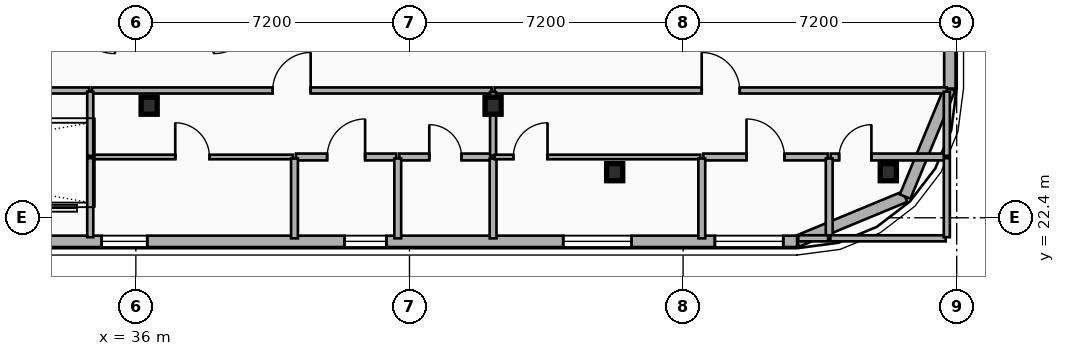
"""IFC4 building model, lengths in metres.
Left out: names, types, materials, properties, quantities, classifications, styles, units other than length and angle.
Written with IfcOpenShell. Run it as: python <this file> out.ifc"""

import sys

from ifc_helpers import new_model, si_unit, direction, frame, frame_2d, origin, origin_2d, place, context, subcontext, project, spatial, rectangle, i_section, extrude, element, fill, save


model = new_model("IFC4")
c1 = context("Model", 3, precision=1e-05, world=origin(), true_north=direction((0.0, 1.0)))
c2 = subcontext(c1, "Body", "Model", "MODEL_VIEW")
j1 = project(units=[si_unit("LENGTHUNIT", "METRE"), si_unit("PLANEANGLEUNIT", "RADIAN")], contexts=[c1])
p1 = place(None, origin())
s1 = spatial("IfcSite", under=j1, at=p1, CompositionType="ELEMENT")
p2 = place(p1, origin())
s2 = spatial("IfcBuilding", under=s1, at=p2, CompositionType="ELEMENT")
p3 = place(p2, frame((0.0, 0.0, 67.5)))
s3 = spatial("IfcBuildingStorey", under=s2, at=p3, CompositionType="ELEMENT", Elevation=67.5)
for number, where, z_axis, x_axis in (
    (1, (36.35, 25.35, 0.0), (0.0, 0.0, 1.0), (1.0, 0.0, 0.0)),
    (2, (45.4, 25.35, 0.0), (0.0, 0.0, 1.0), (1.0, 0.0, 0.0)),
    (3, (48.6, 23.6, 0.0), (0.0, 0.0, 1.0), (1.0, 0.0, 0.0)),
    (4, (55.8, 23.6, 0.0), (0.0, 0.0, 1.0), (1.0, 0.0, 0.0)),
):
    element("IfcColumn", number, at=place(p3, frame(where, z_axis=z_axis, x_axis=x_axis)), inside=s3, PredefinedType="COLUMN", context=c2, shape_type="SweptSolid", body=[
        extrude(i_section(OverallWidth=0.424, OverallDepth=0.45, WebThickness=0.041, FlangeThickness=0.065, FilletRadius=0.015, at=origin_2d()), origin(), (0.0, 0.0, 1.0), 3.5),
    ])
p4 = place(p3, frame((56.243, 22.958, 0.0), z_axis=(0.0, 0.0, 1.0), x_axis=(-0.923882414032, -0.382676475685, 0.0)))
e5 = element("IfcWall", 5, at=p4, inside=s3, PredefinedType="SOLIDWALL", context=c2, shape_type="SweptSolid", body=[
    extrude(rectangle(XDim=3.077, YDim=0.3, at=frame_2d((1.539, 0.0))), origin(), (0.0, 0.0, 1.0), 2.72),
])
p5 = place(p3, frame((57.42, 25.8, 0.0), z_axis=(0.0, 0.0, 1.0), x_axis=(-0.382636798336, -0.92389884758, 0.0)))
e6 = element("IfcWall", 6, at=p5, inside=s3, PredefinedType="SOLIDWALL", context=c2, shape_type="SweptSolid", body=[
    extrude(rectangle(XDim=3.077, YDim=0.3, at=frame_2d((1.538, 0.0))), origin(), (0.0, 0.0, 1.0), 3.24),
])
p6 = place(p3, frame((57.42, 41.0, 0.0), z_axis=(0.0, 0.0, 1.0), x_axis=(0.0, -1.0, 0.0)))
e7 = element("IfcWall", 7, at=p6, inside=s3, PredefinedType="SOLIDWALL", context=c2, shape_type="SweptSolid", body=[
    extrude(rectangle(XDim=15.2, YDim=0.3, at=frame_2d((7.6, 0.0))), origin(), (0.0, 0.0, 1.0), 3.24),
])
p7 = place(p6, frame((8.781, 0.0, 0.48)))
e8 = element("IfcOpeningElement", 8, at=p7, cuts=e7, PredefinedType="OPENING", context=c2, shape_type="SweptSolid", body=[
    extrude(rectangle(XDim=1.4, YDim=1.8, at=frame_2d((0.7, 0.9))), frame((0.0, 0.16, 0.0), z_axis=(0.0, -1.0, 0.0), x_axis=(1.0, 0.0, 0.0)), (0.0, 0.0, 1.0), 0.32),
])
p8 = place(p6, frame((10.94, 0.0, 0.48)))
e9 = element("IfcOpeningElement", 9, at=p8, cuts=e7, PredefinedType="OPENING", context=c2, shape_type="SweptSolid", body=[
    extrude(rectangle(XDim=1.4, YDim=1.8, at=frame_2d((0.7, 0.9))), frame((0.0, 0.16, 0.0), z_axis=(0.0, -1.0, 0.0), x_axis=(1.0, 0.0, 0.0)), (0.0, 0.0, 1.0), 0.32),
])
p9 = place(p6, frame((3.807, 0.0, 0.48)))
e10 = element("IfcOpeningElement", 10, at=p9, cuts=e7, PredefinedType="OPENING", context=c2, shape_type="SweptSolid", body=[
    extrude(rectangle(XDim=1.4, YDim=1.8, at=frame_2d((0.7, 0.9))), frame((0.0, 0.16, 0.0), z_axis=(0.0, -1.0, 0.0), x_axis=(1.0, 0.0, 0.0)), (0.0, 0.0, 1.0), 0.32),
])
p10 = place(p6, frame((5.614, 0.0, 0.48)))
e11 = element("IfcOpeningElement", 11, at=p10, cuts=e7, PredefinedType="OPENING", context=c2, shape_type="SweptSolid", body=[
    extrude(rectangle(XDim=1.4, YDim=1.8, at=frame_2d((0.7, 0.9))), frame((0.0, 0.16, 0.0), z_axis=(0.0, -1.0, 0.0), x_axis=(1.0, 0.0, 0.0)), (0.0, 0.0, 1.0), 0.32),
])
p11 = place(p3, frame((53.4, 21.78, 0.0), z_axis=(0.0, 0.0, 1.0), x_axis=(-1.0, 0.0, 0.0)))
e12 = element("IfcWall", 12, at=p11, inside=s3, PredefinedType="SOLIDWALL", context=c2, shape_type="SweptSolid", body=[
    extrude(rectangle(XDim=49.2, YDim=0.3, at=frame_2d((24.6, 0.0))), origin(), (0.0, 0.0, 1.0), 2.72),
])
p12 = place(p11, frame((45.072, 0.0, 0.48)))
e13 = element("IfcOpeningElement", 13, at=p12, cuts=e12, PredefinedType="OPENING", context=c2, shape_type="SweptSolid", body=[
    extrude(rectangle(XDim=1.8, YDim=1.8, at=frame_2d((0.9, 0.9))), frame((0.0, 0.16, 0.0), z_axis=(0.0, -1.0, 0.0), x_axis=(1.0, 0.0, 0.0)), (0.0, 0.0, 1.0), 0.32),
])
p13 = place(p11, frame((39.8, 0.0, 1.05)))
e14 = element("IfcOpeningElement", 14, at=p13, cuts=e12, PredefinedType="OPENING", context=c2, shape_type="SweptSolid", body=[
    extrude(rectangle(XDim=1.1, YDim=1.05, at=frame_2d((0.55, 0.525))), frame((0.0, 0.16, 0.0), z_axis=(0.0, -1.0, 0.0), x_axis=(1.0, 0.0, 0.0)), (0.0, 0.0, 1.0), 0.32),
])
p14 = place(p11, frame((33.408, 0.0, 0.34)))
e15 = element("IfcOpeningElement", 15, at=p14, cuts=e12, PredefinedType="OPENING", context=c2, shape_type="SweptSolid", body=[
    extrude(rectangle(XDim=1.2, YDim=1.5, at=frame_2d((0.6, 0.75))), frame((0.0, 0.16, 0.0), z_axis=(0.0, -1.0, 0.0), x_axis=(1.0, 0.0, 0.0)), (0.0, 0.0, 1.0), 0.32),
])
p15 = place(p11, frame((17.1, 0.0, 0.68)))
e16 = element("IfcOpeningElement", 16, at=p15, cuts=e12, PredefinedType="OPENING", context=c2, shape_type="SweptSolid", body=[
    extrude(rectangle(XDim=1.2, YDim=1.5, at=frame_2d((0.6, 0.75))), frame((0.0, 0.16, 0.0), z_axis=(0.0, -1.0, 0.0), x_axis=(1.0, 0.0, 0.0)), (0.0, 0.0, 1.0), 0.32),
])
p16 = place(p11, frame((10.808, 0.0, 0.34)))
e17 = element("IfcOpeningElement", 17, at=p16, cuts=e12, PredefinedType="OPENING", context=c2, shape_type="SweptSolid", body=[
    extrude(rectangle(XDim=1.1, YDim=1.05, at=frame_2d((0.55, 0.525))), frame((0.0, 0.16, 0.0), z_axis=(0.0, -1.0, 0.0), x_axis=(1.0, 0.0, 0.0)), (0.0, 0.0, 1.0), 0.32),
])
p17 = place(p11, frame((4.354, 0.0, 0.74)))
e18 = element("IfcOpeningElement", 18, at=p17, cuts=e12, PredefinedType="OPENING", context=c2, shape_type="SweptSolid", body=[
    extrude(rectangle(XDim=1.8, YDim=1.8, at=frame_2d((0.9, 0.9))), frame((0.0, 0.16, 0.0), z_axis=(0.0, -1.0, 0.0), x_axis=(1.0, 0.0, 0.0)), (0.0, 0.0, 1.0), 0.32),
])
p18 = place(p11, frame((0.364, 0.0, 0.74)))
e19 = element("IfcOpeningElement", 19, at=p18, cuts=e12, PredefinedType="OPENING", context=c2, shape_type="SweptSolid", body=[
    extrude(rectangle(XDim=1.8, YDim=1.8, at=frame_2d((0.9, 0.9))), frame((0.0, 0.16, 0.0), z_axis=(0.0, -1.0, 0.0), x_axis=(1.0, 0.0, 0.0)), (0.0, 0.0, 1.0), 0.32),
])
p19 = place(p3, frame((34.84, 25.75, 0.0), z_axis=(0.0, 0.0, 1.0), x_axis=(1.0, 0.0, 0.0)))
e20 = element("IfcWall", 20, at=p19, inside=s3, PredefinedType="PARTITIONING", context=c2, shape_type="SweptSolid", body=[
    extrude(rectangle(XDim=10.52, YDim=0.16, at=frame_2d((5.26, 0.0))), origin(), (0.0, 0.0, 1.0), 2.31),
])
p20 = place(p19, frame((4.76, 0.0, 0.0)))
e21 = element("IfcOpeningElement", 21, at=p20, cuts=e20, PredefinedType="OPENING", context=c2, shape_type="SweptSolid", body=[
    extrude(rectangle(XDim=1.0, YDim=2.15, at=frame_2d((0.5, 1.075))), frame((0.0, 0.09, 0.0), z_axis=(0.0, -1.0, 0.0), x_axis=(1.0, 0.0, 0.0)), (0.0, 0.0, 1.0), 0.18),
])
p21 = place(p3, frame((45.44, 25.75, 0.0), z_axis=(0.0, 0.0, 1.0), x_axis=(1.0, 0.0, 0.0)))
e22 = element("IfcWall", 22, at=p21, inside=s3, PredefinedType="PARTITIONING", context=c2, shape_type="SweptSolid", body=[
    extrude(rectangle(XDim=11.9, YDim=0.16, at=frame_2d((5.95, 0.0))), origin(), (0.0, 0.0, 1.0), 2.31),
])
p22 = place(p21, frame((5.45, 0.0, 0.0)))
e23 = element("IfcOpeningElement", 23, at=p22, cuts=e22, PredefinedType="OPENING", context=c2, shape_type="SweptSolid", body=[
    extrude(rectangle(XDim=1.0, YDim=2.15, at=frame_2d((0.5, 1.075))), frame((0.0, 0.09, 0.0), z_axis=(0.0, -1.0, 0.0), x_axis=(1.0, 0.0, 0.0)), (0.0, 0.0, 1.0), 0.18),
])
p23 = place(p3, frame((34.84, 24.0, 0.0), z_axis=(0.0, 0.0, 1.0), x_axis=(1.0, 0.0, 0.0)))
e24 = element("IfcWall", 24, at=p23, inside=s3, PredefinedType="PARTITIONING", context=c2, shape_type="SweptSolid", body=[
    extrude(rectangle(XDim=5.294, YDim=0.12, at=frame_2d((2.647, 0.0))), origin(), (0.0, 0.0, 1.0), 2.31),
])
p24 = place(p23, frame((2.197, 0.0, 0.0)))
e25 = element("IfcOpeningElement", 25, at=p24, cuts=e24, PredefinedType="OPENING", context=c2, shape_type="SweptSolid", body=[
    extrude(rectangle(XDim=0.9, YDim=2.1, at=frame_2d((0.45, 1.05))), frame((0.0, 0.07, 0.0), z_axis=(0.0, -1.0, 0.0), x_axis=(1.0, 0.0, 0.0)), (0.0, 0.0, 1.0), 0.14),
])
p25 = place(p3, frame((40.214, 24.0, 0.0), z_axis=(0.0, 0.0, 1.0), x_axis=(1.0, 0.0, 0.0)))
e26 = element("IfcWall", 26, at=p25, inside=s3, PredefinedType="PLUMBINGWALL", context=c2, shape_type="SweptSolid", body=[
    extrude(rectangle(XDim=2.638, YDim=0.18, at=frame_2d((1.319, 0.0))), origin(), (0.0, 0.0, 1.0), 3.24),
])
p26 = place(p25, frame((0.819, 0.0, 0.0)))
e27 = element("IfcOpeningElement", 27, at=p26, cuts=e26, PredefinedType="OPENING", context=c2, shape_type="SweptSolid", body=[
    extrude(rectangle(XDim=1.0, YDim=2.15, at=frame_2d((0.5, 1.075))), frame((0.0, 0.1, 0.0), z_axis=(0.0, -1.0, 0.0), x_axis=(1.0, 0.0, 0.0)), (0.0, 0.0, 1.0), 0.2),
])
p27 = place(p3, frame((42.932, 24.0, 0.0), z_axis=(0.0, 0.0, 1.0), x_axis=(1.0, 0.0, 0.0)))
e28 = element("IfcWall", 28, at=p27, inside=s3, PredefinedType="PLUMBINGWALL", context=c2, shape_type="SweptSolid", body=[
    extrude(rectangle(XDim=2.428, YDim=0.18, at=frame_2d((1.214, 0.0))), origin(), (0.0, 0.0, 1.0), 2.31),
])
p28 = place(p27, frame((0.789, 0.0, 0.0)))
e29 = element("IfcOpeningElement", 29, at=p28, cuts=e28, PredefinedType="OPENING", context=c2, shape_type="SweptSolid", body=[
    extrude(rectangle(XDim=0.85, YDim=2.1, at=frame_2d((0.425, 1.05))), frame((0.0, 0.1, 0.0), z_axis=(0.0, -1.0, 0.0), x_axis=(1.0, 0.0, 0.0)), (0.0, 0.0, 1.0), 0.2),
])
p29 = place(p3, frame((45.4, 24.04, 0.0), z_axis=(0.0, 0.0, 1.0), x_axis=(0.0, 1.0, 0.0)))
e30 = element("IfcWall", 30, at=p29, inside=s3, PredefinedType="PARTITIONING", context=c2, shape_type="SweptSolid", body=[
    extrude(rectangle(XDim=1.67, YDim=0.16, at=frame_2d((0.835, 0.0))), origin(), (0.0, 0.0, 1.0), 2.31),
])
for number, where, z_axis, x_axis in (
    (31, (40.174, 21.86, 0.0), (0.0, 0.0, 1.0), (0.0, 1.0, 0.0)),
    (32, (42.892, 21.86, 0.0), (0.0, 0.0, 1.0), (0.0, 1.0, 0.0)),
):
    element("IfcWall", number, at=place(p3, frame(where, z_axis=z_axis, x_axis=x_axis)), inside=s3, PredefinedType="PLUMBINGWALL", context=c2, shape_type="SweptSolid", body=[
        extrude(rectangle(XDim=2.1, YDim=0.18, at=frame_2d((1.05, 0.0))), origin(), (0.0, 0.0, 1.0), 2.73),
    ])
p30 = place(p3, frame((45.4, 21.86, 0.0), z_axis=(0.0, 0.0, 1.0), x_axis=(0.0, 1.0, 0.0)))
e33 = element("IfcWall", 33, at=p30, inside=s3, PredefinedType="PLUMBINGWALL", context=c2, shape_type="SweptSolid", body=[
    extrude(rectangle(XDim=2.1, YDim=0.18, at=frame_2d((1.05, 0.0))), origin(), (0.0, 0.0, 1.0), 2.31),
])
p31 = place(p3, frame((45.44, 24.0, 0.0), z_axis=(0.0, 0.0, 1.0), x_axis=(1.0, 0.0, 0.0)))
e34 = element("IfcWall", 34, at=p31, inside=s3, PredefinedType="PARTITIONING", context=c2, shape_type="SweptSolid", body=[
    extrude(rectangle(XDim=5.412, YDim=0.12, at=frame_2d((2.706, 0.0))), origin(), (0.0, 0.0, 1.0), 2.31),
])
p32 = place(p31, frame((0.493, 0.0, 0.0)))
e35 = element("IfcOpeningElement", 35, at=p32, cuts=e34, PredefinedType="OPENING", context=c2, shape_type="SweptSolid", body=[
    extrude(rectangle(XDim=0.9, YDim=2.1, at=frame_2d((0.45, 1.05))), frame((0.0, 0.07, 0.0), z_axis=(0.0, -1.0, 0.0), x_axis=(1.0, 0.0, 0.0)), (0.0, 0.0, 1.0), 0.14),
])
p33 = place(p3, frame((50.932, 24.0, 0.0), z_axis=(0.0, 0.0, 1.0), x_axis=(1.0, 0.0, 0.0)))
e36 = element("IfcWall", 36, at=p33, inside=s3, PredefinedType="PLUMBINGWALL", context=c2, shape_type="SweptSolid", body=[
    extrude(rectangle(XDim=3.273, YDim=0.18, at=frame_2d((1.637, 0.0))), origin(), (0.0, 0.0, 1.0), 2.57),
])
p34 = place(p33, frame((1.136, 0.0, 0.0)))
e37 = element("IfcOpeningElement", 37, at=p34, cuts=e36, PredefinedType="OPENING", context=c2, shape_type="SweptSolid", body=[
    extrude(rectangle(XDim=1.0, YDim=2.15, at=frame_2d((0.5, 1.075))), frame((0.0, 0.1, 0.0), z_axis=(0.0, -1.0, 0.0), x_axis=(1.0, 0.0, 0.0)), (0.0, 0.0, 1.0), 0.2),
])
p35 = place(p3, frame((54.285, 24.0, 0.0), z_axis=(0.0, 0.0, 1.0), x_axis=(1.0, 0.0, 0.0)))
e38 = element("IfcWall", 38, at=p35, inside=s3, PredefinedType="PLUMBINGWALL", context=c2, shape_type="SweptSolid", body=[
    extrude(rectangle(XDim=3.055, YDim=0.18, at=frame_2d((1.528, 0.0))), origin(), (0.0, 0.0, 1.0), 2.57),
])
p36 = place(p35, frame((0.22, 0.0, 0.0)))
e39 = element("IfcOpeningElement", 39, at=p36, cuts=e38, PredefinedType="OPENING", context=c2, shape_type="SweptSolid", body=[
    extrude(rectangle(XDim=0.85, YDim=2.1, at=frame_2d((0.425, 1.05))), frame((0.0, 0.1, 0.0), z_axis=(0.0, -1.0, 0.0), x_axis=(1.0, 0.0, 0.0)), (0.0, 0.0, 1.0), 0.2),
])
p37 = place(p3, frame((50.892, 21.86, 0.0), z_axis=(0.0, 0.0, 1.0), x_axis=(0.0, 1.0, 0.0)))
e40 = element("IfcWall", 40, at=p37, inside=s3, PredefinedType="PLUMBINGWALL", context=c2, shape_type="SweptSolid", body=[
    extrude(rectangle(XDim=2.1, YDim=0.18, at=frame_2d((1.05, 0.0))), origin(), (0.0, 0.0, 1.0), 2.57),
])
p38 = place(p3, frame((54.245, 21.86, 0.0), z_axis=(0.0, 0.0, 1.0), x_axis=(0.0, 1.0, 0.0)))
e41 = element("IfcWall", 41, at=p38, inside=s3, PredefinedType="PLUMBINGWALL", context=c2, shape_type="SweptSolid", body=[
    extrude(rectangle(XDim=2.1, YDim=0.18, at=frame_2d((1.05, 0.0))), origin(), (0.0, 0.0, 1.0), 2.72),
])
p39 = place(p3, frame((22.83, 25.75, 0.0), z_axis=(0.0, 0.0, 1.0), x_axis=(1.0, 0.0, 0.0)))
e42 = element("IfcWall", 42, at=p39, inside=s3, PredefinedType="PARTITIONING", context=c2, shape_type="SweptSolid", body=[
    extrude(rectangle(XDim=11.94, YDim=0.16, at=frame_2d((5.97, 0.0))), origin(), (0.0, 0.0, 1.0), 3.24),
])
p40 = place(p3, frame((34.8, 24.03, 0.0), z_axis=(0.0, 0.0, 1.0), x_axis=(0.0, 1.0, 0.0)))
e43 = element("IfcWall", 43, at=p40, inside=s3, PredefinedType="PARTITIONING", context=c2, shape_type="SweptSolid", body=[
    extrude(rectangle(XDim=1.69, YDim=0.16, at=frame_2d((0.845, 0.0))), origin(), (0.0, 0.0, 1.0), 3.24),
])
p41 = place(p3, frame((34.8, 21.89, 0.0), z_axis=(0.0, 0.0, 1.0), x_axis=(0.0, 1.0, 0.0)))
e44 = element("IfcWall", 44, at=p41, inside=s3, PredefinedType="PARTITIONING", context=c2, shape_type="SweptSolid", body=[
    extrude(rectangle(XDim=2.08, YDim=0.16, at=frame_2d((1.04, 0.0))), origin(), (0.0, 0.0, 1.0), 2.68),
])
p42 = place(p3, frame((57.34, 24.03, 0.0), z_axis=(0.0, 0.0, 1.0), x_axis=(0.0, 1.0, 0.0)))
e45 = element("IfcWall", 45, at=p42, inside=s3, PredefinedType="PARTITIONING", context=c2, shape_type="SweptSolid", body=[
    extrude(rectangle(XDim=1.69, YDim=0.16, at=frame_2d((0.845, 0.0))), origin(), (0.0, 0.0, 1.0), 3.24),
])
p43 = place(p3, frame((53.43, 21.86, 0.0), z_axis=(0.0, 0.0, 1.0), x_axis=(1.0, 0.0, 0.0)))
e46 = element("IfcWall", 46, at=p43, inside=s3, PredefinedType="PARTITIONING", context=c2, shape_type="SweptSolid", body=[
    extrude(rectangle(XDim=0.785, YDim=0.16, at=frame_2d((0.393, 0.0))), origin(), (0.0, 0.0, 1.0), 2.72),
])
p44 = place(p3, frame((54.275, 21.86, 0.0), z_axis=(0.0, 0.0, 1.0), x_axis=(1.0, 0.0, 0.0)))
e47 = element("IfcWall", 47, at=p44, inside=s3, PredefinedType="PARTITIONING", context=c2, shape_type="SweptSolid", body=[
    extrude(rectangle(XDim=3.035, YDim=0.16, at=frame_2d((1.518, 0.0))), origin(), (0.0, 0.0, 1.0), 2.72),
])
p45 = place(p3, frame((57.34, 21.89, 0.0), z_axis=(0.0, 0.0, 1.0), x_axis=(0.0, 1.0, 0.0)))
e48 = element("IfcWall", 48, at=p45, inside=s3, PredefinedType="PARTITIONING", context=c2, shape_type="SweptSolid", body=[
    extrude(rectangle(XDim=2.08, YDim=0.16, at=frame_2d((1.04, 0.0))), origin(), (0.0, 0.0, 1.0), 3.24),
])
p46 = place(p15, origin())
e49 = element("IfcWindow", 49, at=p46, inside=s3, PartitioningType="SINGLE_PANEL", PredefinedType="WINDOW", context=c2, shape_type="SweptSolid", body=[
    extrude(rectangle(XDim=1.2, YDim=1.5, at=frame_2d((0.6, 0.75))), frame((0.0, 0.03, 0.0), z_axis=(0.0, -1.0, 0.0), x_axis=(1.0, 0.0, 0.0)), (0.0, 0.0, 1.0), 0.06),
])
fill(e16, e49)
p47 = place(p16, origin())
e50 = element("IfcWindow", 50, at=p47, inside=s3, PartitioningType="SINGLE_PANEL", PredefinedType="WINDOW", context=c2, shape_type="SweptSolid", body=[
    extrude(rectangle(XDim=1.1, YDim=1.05, at=frame_2d((0.55, 0.525))), frame((0.0, 0.03, 0.0), z_axis=(0.0, -1.0, 0.0), x_axis=(1.0, 0.0, 0.0)), (0.0, 0.0, 1.0), 0.06),
])
fill(e17, e50)
p48 = place(p17, origin())
e51 = element("IfcWindow", 51, at=p48, inside=s3, PartitioningType="SINGLE_PANEL", PredefinedType="WINDOW", context=c2, shape_type="SweptSolid", body=[
    extrude(rectangle(XDim=1.8, YDim=1.8, at=frame_2d((0.9, 0.9))), frame((0.0, 0.03, 0.0), z_axis=(0.0, -1.0, 0.0), x_axis=(1.0, 0.0, 0.0)), (0.0, 0.0, 1.0), 0.06),
])
fill(e18, e51)
p49 = place(p18, origin())
e52 = element("IfcWindow", 52, at=p49, inside=s3, PartitioningType="SINGLE_PANEL", PredefinedType="WINDOW", context=c2, shape_type="SweptSolid", body=[
    extrude(rectangle(XDim=1.8, YDim=1.8, at=frame_2d((0.9, 0.9))), frame((0.0, 0.03, 0.0), z_axis=(0.0, -1.0, 0.0), x_axis=(1.0, 0.0, 0.0)), (0.0, 0.0, 1.0), 0.06),
])
fill(e19, e52)
p50 = place(p20, origin())
e53 = element("IfcDoor", 53, at=p50, inside=s3, OperationType="SINGLE_SWING_RIGHT", PredefinedType="DOOR", context=c2, shape_type="SweptSolid", body=[
    extrude(rectangle(XDim=1.0, YDim=2.15, at=frame_2d((0.5, 1.075))), frame((0.0, 0.025, 0.0), z_axis=(0.0, -1.0, 0.0), x_axis=(1.0, 0.0, 0.0)), (0.0, 0.0, 1.0), 0.05),
])
fill(e21, e53)
p51 = place(p22, origin())
e54 = element("IfcDoor", 54, at=p51, inside=s3, OperationType="SINGLE_SWING_LEFT", PredefinedType="DOOR", context=c2, shape_type="SweptSolid", body=[
    extrude(rectangle(XDim=1.0, YDim=2.15, at=frame_2d((0.5, 1.075))), frame((0.0, 0.025, 0.0), z_axis=(0.0, -1.0, 0.0), x_axis=(1.0, 0.0, 0.0)), (0.0, 0.0, 1.0), 0.05),
])
fill(e23, e54)
p52 = place(p24, origin())
e55 = element("IfcDoor", 55, at=p52, inside=s3, OperationType="SINGLE_SWING_LEFT", PredefinedType="DOOR", context=c2, shape_type="SweptSolid", body=[
    extrude(rectangle(XDim=0.9, YDim=2.1, at=frame_2d((0.45, 1.05))), frame((0.0, 0.025, 0.0), z_axis=(0.0, -1.0, 0.0), x_axis=(1.0, 0.0, 0.0)), (0.0, 0.0, 1.0), 0.05),
])
fill(e25, e55)
p53 = place(p26, origin())
e56 = element("IfcDoor", 56, at=p53, inside=s3, OperationType="SINGLE_SWING_RIGHT", PredefinedType="DOOR", context=c2, shape_type="SweptSolid", body=[
    extrude(rectangle(XDim=1.0, YDim=2.15, at=frame_2d((0.5, 1.075))), frame((0.0, 0.025, 0.0), z_axis=(0.0, -1.0, 0.0), x_axis=(1.0, 0.0, 0.0)), (0.0, 0.0, 1.0), 0.05),
])
fill(e27, e56)
p54 = place(p28, origin())
e57 = element("IfcDoor", 57, at=p54, inside=s3, OperationType="SINGLE_SWING_LEFT", PredefinedType="DOOR", context=c2, shape_type="SweptSolid", body=[
    extrude(rectangle(XDim=0.85, YDim=2.1, at=frame_2d((0.425, 1.05))), frame((0.0, 0.025, 0.0), z_axis=(0.0, -1.0, 0.0), x_axis=(1.0, 0.0, 0.0)), (0.0, 0.0, 1.0), 0.05),
])
fill(e29, e57)
p55 = place(p32, origin())
e58 = element("IfcDoor", 58, at=p55, inside=s3, OperationType="SINGLE_SWING_RIGHT", PredefinedType="DOOR", context=c2, shape_type="SweptSolid", body=[
    extrude(rectangle(XDim=0.9, YDim=2.1, at=frame_2d((0.45, 1.05))), frame((0.0, 0.025, 0.0), z_axis=(0.0, -1.0, 0.0), x_axis=(1.0, 0.0, 0.0)), (0.0, 0.0, 1.0), 0.05),
])
fill(e35, e58)
p56 = place(p34, origin())
e59 = element("IfcDoor", 59, at=p56, inside=s3, OperationType="SINGLE_SWING_LEFT", PredefinedType="DOOR", context=c2, shape_type="SweptSolid", body=[
    extrude(rectangle(XDim=1.0, YDim=2.15, at=frame_2d((0.5, 1.075))), frame((0.0, 0.025, 0.0), z_axis=(0.0, -1.0, 0.0), x_axis=(1.0, 0.0, 0.0)), (0.0, 0.0, 1.0), 0.05),
])
fill(e37, e59)
p57 = place(p36, origin())
e60 = element("IfcDoor", 60, at=p57, inside=s3, OperationType="SINGLE_SWING_RIGHT", PredefinedType="DOOR", context=c2, shape_type="SweptSolid", body=[
    extrude(rectangle(XDim=0.85, YDim=2.1, at=frame_2d((0.425, 1.05))), frame((0.0, 0.025, 0.0), z_axis=(0.0, -1.0, 0.0), x_axis=(1.0, 0.0, 0.0)), (0.0, 0.0, 1.0), 0.05),
])
fill(e39, e60)
save(model, sys.argv[1])
